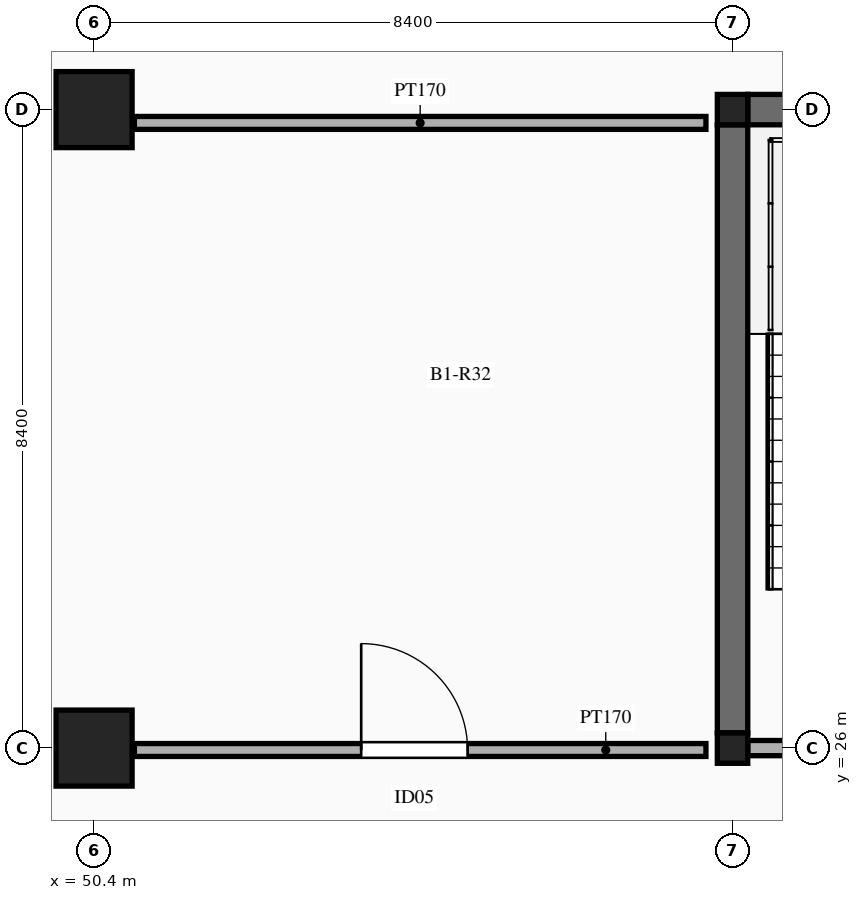
"""IFC4 building model, lengths in metres.
Left out: names, types, materials, properties, quantities, classifications, styles, units other than length and angle.
Written with IfcOpenShell. Run it as: python <this file> out.ifc"""

import sys

from ifc_helpers import new_model, si_unit, direction, frame, frame_2d, origin, origin_2d, place, context, subcontext, project, spatial, rectangle, extrude, element, fill, save


model = new_model("IFC4")
c1 = context("Model", 3, precision=1e-05, world=origin(), true_north=direction((0.0, 1.0)))
c2 = subcontext(c1, "Body", "Model", "MODEL_VIEW")
j1 = project(units=[si_unit("LENGTHUNIT", "METRE"), si_unit("PLANEANGLEUNIT", "RADIAN")], contexts=[c1])
p1 = place(None, origin())
s1 = spatial("IfcSite", under=j1, at=p1, CompositionType="ELEMENT")
p2 = place(p1, origin())
s2 = spatial("IfcBuilding", under=s1, at=p2, CompositionType="ELEMENT")
p3 = place(p2, frame((0.0, 0.0, -4.5)))
s3 = spatial("IfcBuildingStorey", under=s2, at=p3, CompositionType="ELEMENT", Elevation=-4.5)
for number, where, z_axis, x_axis in (
    (1, (50.4, 26.0, 0.0), (0.0, 0.0, 1.0), (1.0, 0.0, 0.0)),
    (2, (50.4, 34.4, 0.0), (0.0, 0.0, 1.0), (1.0, 0.0, 0.0)),
):
    element("IfcColumn", number, at=place(p3, frame(where, z_axis=z_axis, x_axis=x_axis)), inside=s3, PredefinedType="COLUMN", context=c2, shape_type="SweptSolid", body=[
        extrude(rectangle(XDim=1.0, YDim=1.0, at=origin_2d()), origin(), (0.0, 0.0, 1.0), 4.5),
    ])
for number, where, z_axis, x_axis in (
    (3, (58.8, 26.0, 0.0), (0.0, 0.0, 1.0), (1.0, 0.0, 0.0)),
    (4, (58.8, 34.4, 0.0), (0.0, 0.0, 1.0), (1.0, 0.0, 0.0)),
):
    element("IfcColumn", number, at=place(p3, frame(where, z_axis=z_axis, x_axis=x_axis)), inside=s3, PredefinedType="COLUMN", context=c2, shape_type="SweptSolid", body=[
        extrude(rectangle(XDim=0.4, YDim=0.4, at=origin_2d()), origin(), (0.0, 0.0, 1.0), 4.5),
    ])
for number, where, z_axis, x_axis in (
    (5, (58.8, 26.2, 0.0), (0.0, 0.0, 1.0), (0.0, 1.0, 0.0)),
    (6, (59.0, 34.4, 0.0), (0.0, 0.0, 1.0), (1.0, 0.0, 0.0)),
):
    element("IfcWall", number, at=place(p3, frame(where, z_axis=z_axis, x_axis=x_axis)), inside=s3, PredefinedType="SHEAR", context=c2, shape_type="SweptSolid", body=[
        extrude(rectangle(XDim=8.0, YDim=0.4, at=frame_2d((4.0, 0.0))), origin(), (0.0, 0.0, 1.0), 4.5),
    ])
p4 = place(p3, frame((59.0, 26.0, 0.0), z_axis=(0.0, 0.0, 1.0), x_axis=(1.0, 0.0, 0.0)))
e7 = element("IfcWall", 7, at=p4, inside=s3, PredefinedType="SOLIDWALL", context=c2, shape_type="SweptSolid", body=[
    extrude(rectangle(XDim=8.0, YDim=0.2, at=frame_2d((4.0, 0.0))), origin(), (0.0, 0.0, 1.0), 3.63),
])
p5 = place(p4, frame((1.55, 0.0, 0.0)))
e8 = element("IfcOpeningElement", 8, at=p5, cuts=e7, PredefinedType="OPENING", context=c2, shape_type="SweptSolid", body=[
    extrude(rectangle(XDim=1.15, YDim=2.15, at=frame_2d((0.575, 1.075))), frame((0.0, 0.11, 0.0), z_axis=(0.0, -1.0, 0.0), x_axis=(1.0, 0.0, 0.0)), (0.0, 0.0, 1.0), 0.22),
])
p6 = place(p4, frame((5.35, 0.0, 0.0)))
e9 = element("IfcOpeningElement", 9, at=p6, cuts=e7, PredefinedType="OPENING", context=c2, shape_type="SweptSolid", body=[
    extrude(rectangle(XDim=1.22, YDim=2.15, at=frame_2d((0.61, 1.075))), frame((0.0, 0.11, 0.0), z_axis=(0.0, -1.0, 0.0), x_axis=(1.0, 0.0, 0.0)), (0.0, 0.0, 1.0), 0.22),
])
p7 = place(p3, frame((50.93, 25.975, 0.0), z_axis=(0.0, 0.0, 1.0), x_axis=(1.0, 0.0, 0.0)))
e10 = element("IfcWall", 10, at=p7, inside=s3, PredefinedType="PARTITIONING", context=c2, shape_type="SweptSolid", body=[
    extrude(rectangle(XDim=7.52, YDim=0.17, at=frame_2d((3.76, 0.0))), origin(), (0.0, 0.0, 1.0), 3.45),
])
p8 = place(p7, frame((2.984, 0.0, 0.0)))
e11 = element("IfcOpeningElement", 11, at=p8, cuts=e10, PredefinedType="OPENING", context=c2, shape_type="SweptSolid", body=[
    extrude(rectangle(XDim=1.4, YDim=2.25, at=frame_2d((0.7, 1.125))), frame((0.0, 0.095, 0.0), z_axis=(0.0, -1.0, 0.0), x_axis=(1.0, 0.0, 0.0)), (0.0, 0.0, 1.0), 0.19),
])
p9 = place(p3, frame((50.93, 34.225, 0.0), z_axis=(0.0, 0.0, 1.0), x_axis=(1.0, 0.0, 0.0)))
e12 = element("IfcWall", 12, at=p9, inside=s3, PredefinedType="PARTITIONING", context=c2, shape_type="SweptSolid", body=[
    extrude(rectangle(XDim=7.52, YDim=0.17, at=frame_2d((3.76, 0.0))), origin(), (0.0, 0.0, 1.0), 3.45),
])
p10 = place(p8, origin())
e13 = element("IfcDoor", 13, at=p10, inside=s3, OperationType="SINGLE_SWING_LEFT", PredefinedType="DOOR", context=c2, shape_type="SweptSolid", body=[
    extrude(rectangle(XDim=1.4, YDim=2.25, at=frame_2d((0.7, 1.125))), frame((0.0, 0.025, 0.0), z_axis=(0.0, -1.0, 0.0), x_axis=(1.0, 0.0, 0.0)), (0.0, 0.0, 1.0), 0.05),
])
fill(e11, e13)
save(model, sys.argv[1])
